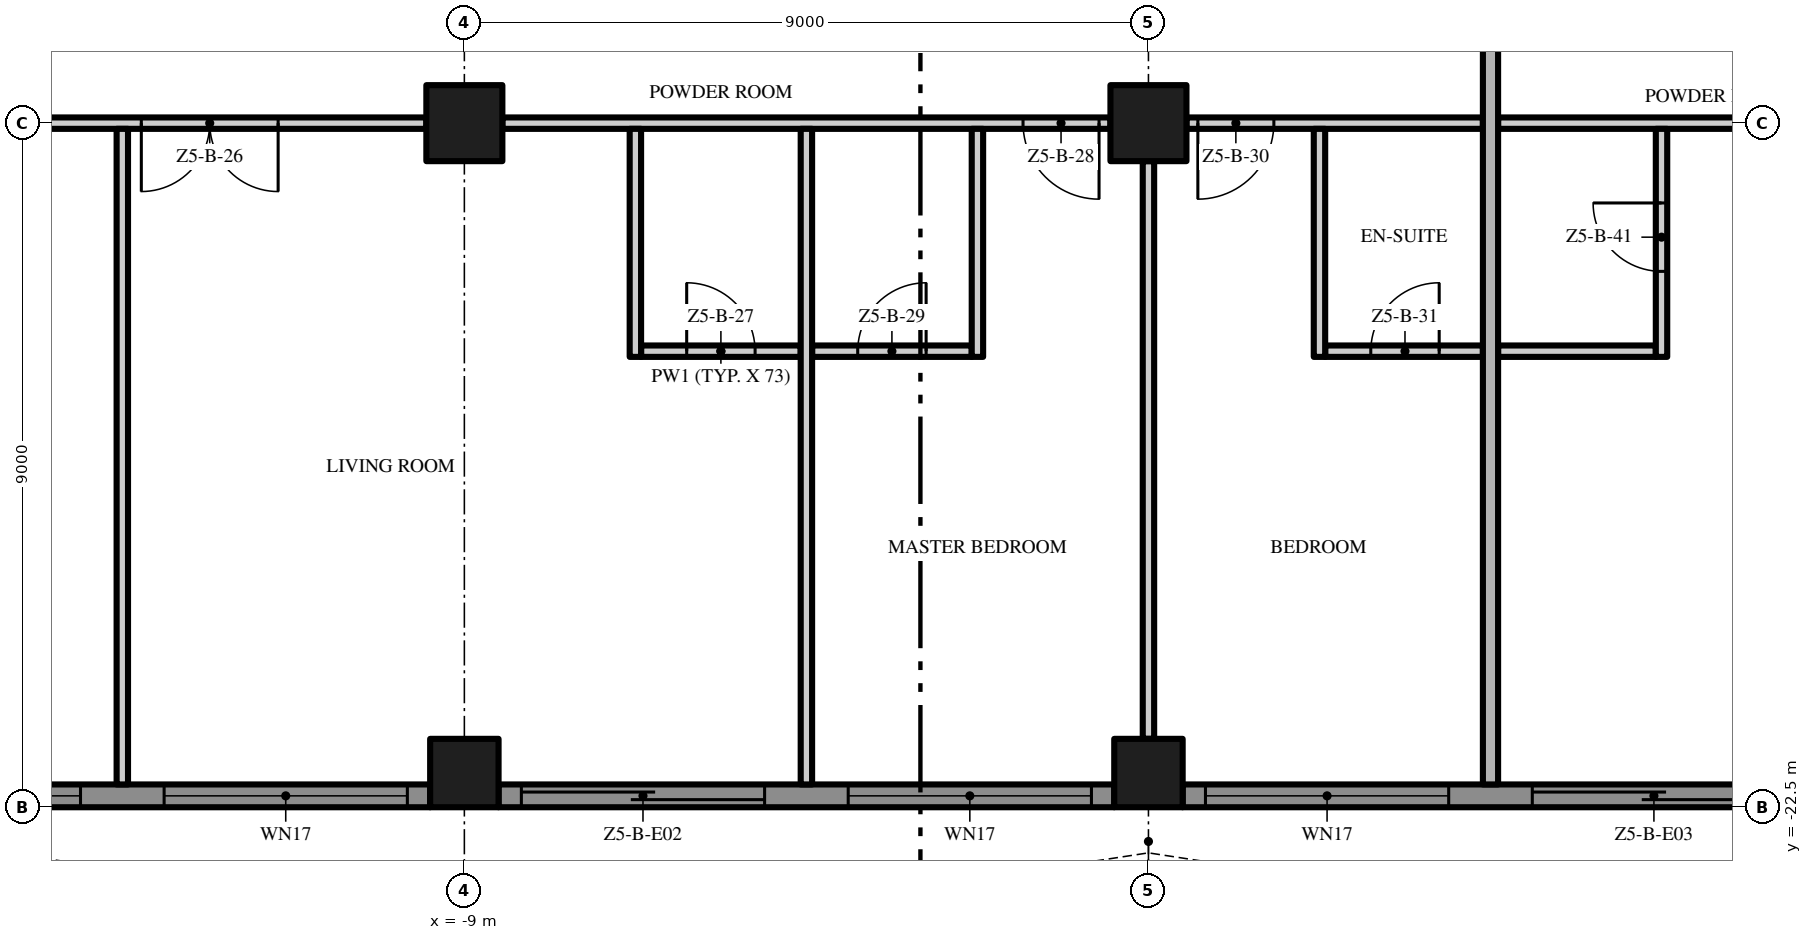
"""IFC4 building model, lengths in metres.
Left out: names, types, materials, properties, quantities, classifications, styles, units other than length and angle.
Written with IfcOpenShell. Run it as: python <this file> out.ifc"""

import sys

from ifc_helpers import new_model, si_unit, direction, frame, frame_2d, origin, origin_2d, place, context, subcontext, project, spatial, polyline, rectangle, outline, extrude, element, fill, save


model = new_model("IFC4")
c1 = context("Model", 3, precision=1e-05, world=origin(), true_north=direction((0.0, 1.0)))
c2 = subcontext(c1, "Body", "Model", "MODEL_VIEW")
j1 = project(units=[si_unit("LENGTHUNIT", "METRE"), si_unit("PLANEANGLEUNIT", "RADIAN")], contexts=[c1])
p1 = place(None, origin())
s1 = spatial("IfcSite", under=j1, at=p1, CompositionType="ELEMENT")
p2 = place(p1, origin())
s2 = spatial("IfcBuilding", under=s1, at=p2, CompositionType="ELEMENT")
p3 = place(p2, frame((0.0, 0.0, 250.2)))
s3 = spatial("IfcBuildingStorey", under=s2, at=p3, CompositionType="ELEMENT", Elevation=250.2)
p4 = place(p3, frame((-9.0, -13.5, 0.0), z_axis=(0.0, 0.0, 1.0), x_axis=(1.0, 0.0, 0.0)))
e1 = element("IfcColumn", 1, at=p4, inside=s3, PredefinedType="COLUMN", context=c2, shape_type="SweptSolid", body=[
    extrude(rectangle(XDim=1.0, YDim=1.0, at=origin_2d()), origin(), (0.0, 0.0, 1.0), 3.5),
])
p5 = place(p3, frame((-9.0, -22.05, 0.0), z_axis=(0.0, 0.0, 1.0), x_axis=(1.0, 0.0, 0.0)))
e2 = element("IfcColumn", 2, at=p5, inside=s3, PredefinedType="COLUMN", context=c2, shape_type="SweptSolid", body=[
    extrude(rectangle(XDim=0.9, YDim=0.9, at=origin_2d()), origin(), (0.0, 0.0, 1.0), 3.5),
])
p6 = place(p3, frame((0.0, -13.5, 0.0), z_axis=(0.0, 0.0, 1.0), x_axis=(1.0, 0.0, 0.0)))
e3 = element("IfcColumn", 3, at=p6, inside=s3, PredefinedType="COLUMN", context=c2, shape_type="SweptSolid", body=[
    extrude(rectangle(XDim=1.0, YDim=1.0, at=origin_2d()), origin(), (0.0, 0.0, 1.0), 3.5),
])
p7 = place(p3, frame((0.0, -22.05, 0.0), z_axis=(0.0, 0.0, 1.0), x_axis=(1.0, 0.0, 0.0)))
e4 = element("IfcColumn", 4, at=p7, inside=s3, PredefinedType="COLUMN", context=c2, shape_type="SweptSolid", body=[
    extrude(rectangle(XDim=0.9, YDim=0.9, at=origin_2d()), origin(), (0.0, 0.0, 1.0), 3.5),
])
p8 = place(p3, frame((-9.45, -22.35, 0.0), z_axis=(0.0, 0.0, 1.0), x_axis=(-1.0, 0.0, 0.0)))
e5 = element("IfcWall", 5, at=p8, inside=s3, PredefinedType="SOLIDWALL", context=c2, shape_type="SweptSolid", body=[
    extrude(rectangle(XDim=8.1, YDim=0.3, at=frame_2d((4.05, 0.0))), origin(), (0.0, 0.0, 1.0), 3.5),
])
p9 = place(p8, frame((4.6, 0.0, 0.45)))
e6 = element("IfcOpeningElement", 6, at=p9, cuts=e5, PredefinedType="OPENING", context=c2, shape_type="SweptSolid", body=[
    extrude(rectangle(XDim=3.2, YDim=2.65, at=frame_2d((1.6, 1.325))), frame((0.0, 0.16, 0.0), z_axis=(0.0, -1.0, 0.0), x_axis=(1.0, 0.0, 0.0)), (0.0, 0.0, 1.0), 0.32),
])
p10 = place(p8, frame((0.3, 0.0, 0.45)))
e7 = element("IfcOpeningElement", 7, at=p10, cuts=e5, PredefinedType="OPENING", context=c2, shape_type="SweptSolid", body=[
    extrude(rectangle(XDim=3.2, YDim=2.65, at=frame_2d((1.6, 1.325))), frame((0.0, 0.16, 0.0), z_axis=(0.0, -1.0, 0.0), x_axis=(1.0, 0.0, 0.0)), (0.0, 0.0, 1.0), 0.32),
])
p11 = place(p3, frame((-0.45, -22.35, 0.0), z_axis=(0.0, 0.0, 1.0), x_axis=(-1.0, 0.0, 0.0)))
e8 = element("IfcWall", 8, at=p11, inside=s3, PredefinedType="SOLIDWALL", context=c2, shape_type="SweptSolid", body=[
    extrude(rectangle(XDim=8.1, YDim=0.3, at=frame_2d((4.05, 0.0))), origin(), (0.0, 0.0, 1.0), 3.5),
])
p12 = place(p11, frame((4.6, 0.0, 0.0)))
e9 = element("IfcOpeningElement", 9, at=p12, cuts=e8, PredefinedType="OPENING", context=c2, shape_type="SweptSolid", body=[
    extrude(rectangle(XDim=3.2, YDim=2.4, at=frame_2d((1.6, 1.2))), frame((0.0, 0.16, 0.0), z_axis=(0.0, -1.0, 0.0), x_axis=(1.0, 0.0, 0.0)), (0.0, 0.0, 1.0), 0.32),
])
p13 = place(p11, frame((0.3, 0.0, 0.45)))
e10 = element("IfcOpeningElement", 10, at=p13, cuts=e8, PredefinedType="OPENING", context=c2, shape_type="SweptSolid", body=[
    extrude(rectangle(XDim=3.2, YDim=2.65, at=frame_2d((1.6, 1.325))), frame((0.0, 0.16, 0.0), z_axis=(0.0, -1.0, 0.0), x_axis=(1.0, 0.0, 0.0)), (0.0, 0.0, 1.0), 0.32),
])
p14 = place(p3, frame((8.55, -22.35, 0.0), z_axis=(0.0, 0.0, 1.0), x_axis=(-1.0, 0.0, 0.0)))
e11 = element("IfcWall", 11, at=p14, inside=s3, PredefinedType="SOLIDWALL", context=c2, shape_type="SweptSolid", body=[
    extrude(rectangle(XDim=8.1, YDim=0.3, at=frame_2d((4.05, 0.0))), origin(), (0.0, 0.0, 1.0), 3.5),
])
p15 = place(p14, frame((4.6, 0.0, 0.45)))
e12 = element("IfcOpeningElement", 12, at=p15, cuts=e11, PredefinedType="OPENING", context=c2, shape_type="SweptSolid", body=[
    extrude(rectangle(XDim=3.2, YDim=2.65, at=frame_2d((1.6, 1.325))), frame((0.0, 0.16, 0.0), z_axis=(0.0, -1.0, 0.0), x_axis=(1.0, 0.0, 0.0)), (0.0, 0.0, 1.0), 0.32),
])
p16 = place(p14, frame((0.3, 0.0, 0.0)))
e13 = element("IfcOpeningElement", 13, at=p16, cuts=e11, PredefinedType="OPENING", context=c2, shape_type="SweptSolid", body=[
    extrude(rectangle(XDim=3.2, YDim=2.4, at=frame_2d((1.6, 1.2))), frame((0.0, 0.16, 0.0), z_axis=(0.0, -1.0, 0.0), x_axis=(1.0, 0.0, 0.0)), (0.0, 0.0, 1.0), 0.32),
])
p17 = place(p3, origin())
e14 = element("IfcWall", 14, at=p17, inside=s3, PredefinedType="USERDEFINED", context=c2, shape_type="SweptSolid", body=[
    extrude(outline(polyline([(-22.5, -25.5), (-21.0, -25.271), (-19.5, -24.671), (-18.0, -23.929), (-16.5, -23.329), (-15.0, -23.1), (-13.5, -23.329), (-12.0, -23.929), (-10.5, -24.671), (-9.0, -25.271), (-7.5, -25.5), (-6.0, -25.271), (-4.5, -24.671), (-3.0, -23.929), (-1.5, -23.329), (0.0, -23.1), (1.5, -23.329), (3.0, -23.929), (4.5, -24.671), (6.0, -25.271), (7.5, -25.5), (9.0, -25.271), (10.5, -24.671), (12.0, -23.929), (13.5, -23.329), (15.0, -23.1), (16.5, -23.329), (18.0, -23.929), (19.5, -24.671), (21.0, -25.271), (22.5, -25.5), (22.538, -25.253), (21.066, -25.028), (19.602, -24.442), (18.102, -23.701), (16.566, -23.086), (15.0, -22.847), (13.434, -23.086), (11.898, -23.701), (10.398, -24.442), (8.934, -25.028), (7.5, -25.247), (6.066, -25.028), (4.602, -24.442), (3.102, -23.701), (1.566, -23.086), (0.0, -22.847), (-1.566, -23.086), (-3.102, -23.701), (-4.602, -24.442), (-6.066, -25.028), (-7.5, -25.247), (-8.934, -25.028), (-10.398, -24.442), (-11.898, -23.701), (-13.434, -23.086), (-15.0, -22.847), (-16.566, -23.086), (-18.102, -23.701), (-19.602, -24.442), (-21.066, -25.028), (-22.538, -25.253), (-22.5, -25.5)])), origin(), (0.0, 0.0, 1.0), 0.9),
])
p18 = place(p3, frame((-6.675, -16.5, 0.0), z_axis=(0.0, 0.0, 1.0), x_axis=(1.0, 0.0, 0.0)))
e15 = element("IfcWall", 15, at=p18, inside=s3, PredefinedType="PARTITIONING", context=c2, shape_type="SweptSolid", body=[
    extrude(rectangle(XDim=2.1, YDim=0.15, at=frame_2d((1.05, 0.0))), origin(), (0.0, 0.0, 1.0), 3.5),
])
p19 = place(p18, frame((0.6, 0.0, 0.0)))
e16 = element("IfcOpeningElement", 16, at=p19, cuts=e15, PredefinedType="OPENING", context=c2, shape_type="SweptSolid", body=[
    extrude(rectangle(XDim=0.9, YDim=2.1, at=frame_2d((0.45, 1.05))), frame((0.0, 0.085, 0.0), z_axis=(0.0, -1.0, 0.0), x_axis=(1.0, 0.0, 0.0)), (0.0, 0.0, 1.0), 0.17),
])
p20 = place(p3, frame((-4.425, -16.5, 0.0), z_axis=(0.0, 0.0, 1.0), x_axis=(1.0, 0.0, 0.0)))
e17 = element("IfcWall", 17, at=p20, inside=s3, PredefinedType="PARTITIONING", context=c2, shape_type="SweptSolid", body=[
    extrude(rectangle(XDim=2.1, YDim=0.15, at=frame_2d((1.05, 0.0))), origin(), (0.0, 0.0, 1.0), 3.5),
])
p21 = place(p20, frame((0.6, 0.0, 0.0)))
e18 = element("IfcOpeningElement", 18, at=p21, cuts=e17, PredefinedType="OPENING", context=c2, shape_type="SweptSolid", body=[
    extrude(rectangle(XDim=0.9, YDim=2.1, at=frame_2d((0.45, 1.05))), frame((0.0, 0.085, 0.0), z_axis=(0.0, -1.0, 0.0), x_axis=(1.0, 0.0, 0.0)), (0.0, 0.0, 1.0), 0.17),
])
p22 = place(p3, frame((2.325, -16.5, 0.0), z_axis=(0.0, 0.0, 1.0), x_axis=(1.0, 0.0, 0.0)))
e19 = element("IfcWall", 19, at=p22, inside=s3, PredefinedType="PARTITIONING", context=c2, shape_type="SweptSolid", body=[
    extrude(rectangle(XDim=2.075, YDim=0.15, at=frame_2d((1.038, 0.0))), origin(), (0.0, 0.0, 1.0), 3.5),
])
p23 = place(p22, frame((0.6, 0.0, 0.0)))
e20 = element("IfcOpeningElement", 20, at=p23, cuts=e19, PredefinedType="OPENING", context=c2, shape_type="SweptSolid", body=[
    extrude(rectangle(XDim=0.9, YDim=2.1, at=frame_2d((0.45, 1.05))), frame((0.0, 0.085, 0.0), z_axis=(0.0, -1.0, 0.0), x_axis=(1.0, 0.0, 0.0)), (0.0, 0.0, 1.0), 0.17),
])
p24 = place(p3, frame((4.6, -16.5, 0.0), z_axis=(0.0, 0.0, 1.0), x_axis=(1.0, 0.0, 0.0)))
e21 = element("IfcWall", 21, at=p24, inside=s3, PredefinedType="PARTITIONING", context=c2, shape_type="SweptSolid", body=[
    extrude(rectangle(XDim=2.075, YDim=0.15, at=frame_2d((1.038, 0.0))), origin(), (0.0, 0.0, 1.0), 3.5),
])
p25 = place(p3, frame((-9.5, -13.5, 0.0), z_axis=(0.0, 0.0, 1.0), x_axis=(-1.0, 0.0, 0.0)))
e22 = element("IfcWall", 22, at=p25, inside=s3, PredefinedType="PARTITIONING", context=c2, shape_type="SweptSolid", body=[
    extrude(rectangle(XDim=8.0, YDim=0.15, at=frame_2d((4.0, 0.0))), origin(), (0.0, 0.0, 1.0), 3.5),
])
p26 = place(p25, frame((1.95, 0.0, 0.0)))
e23 = element("IfcOpeningElement", 23, at=p26, cuts=e22, PredefinedType="OPENING", context=c2, shape_type="SweptSolid", body=[
    extrude(rectangle(XDim=1.8, YDim=2.4, at=frame_2d((0.9, 1.2))), frame((0.0, 0.085, 0.0), z_axis=(0.0, -1.0, 0.0), x_axis=(1.0, 0.0, 0.0)), (0.0, 0.0, 1.0), 0.17),
])
p27 = place(p3, frame((-0.5, -13.5, 0.0), z_axis=(0.0, 0.0, 1.0), x_axis=(-1.0, 0.0, 0.0)))
e24 = element("IfcWall", 24, at=p27, inside=s3, PredefinedType="PARTITIONING", context=c2, shape_type="SweptSolid", body=[
    extrude(rectangle(XDim=8.0, YDim=0.15, at=frame_2d((4.0, 0.0))), origin(), (0.0, 0.0, 1.0), 3.5),
])
p28 = place(p27, frame((0.15, 0.0, 0.0)))
e25 = element("IfcOpeningElement", 25, at=p28, cuts=e24, PredefinedType="OPENING", context=c2, shape_type="SweptSolid", body=[
    extrude(rectangle(XDim=1.0, YDim=2.4, at=frame_2d((0.5, 1.2))), frame((0.0, 0.085, 0.0), z_axis=(0.0, -1.0, 0.0), x_axis=(1.0, 0.0, 0.0)), (0.0, 0.0, 1.0), 0.17),
])
p29 = place(p3, frame((4.4, -13.5, 0.0), z_axis=(0.0, 0.0, 1.0), x_axis=(-1.0, 0.0, 0.0)))
e26 = element("IfcWall", 26, at=p29, inside=s3, PredefinedType="PARTITIONING", context=c2, shape_type="SweptSolid", body=[
    extrude(rectangle(XDim=3.9, YDim=0.15, at=frame_2d((1.95, 0.0))), origin(), (0.0, 0.0, 1.0), 3.5),
])
p30 = place(p29, frame((2.75, 0.0, 0.0)))
e27 = element("IfcOpeningElement", 27, at=p30, cuts=e26, PredefinedType="OPENING", context=c2, shape_type="SweptSolid", body=[
    extrude(rectangle(XDim=1.0, YDim=2.4, at=frame_2d((0.5, 1.2))), frame((0.0, 0.085, 0.0), z_axis=(0.0, -1.0, 0.0), x_axis=(1.0, 0.0, 0.0)), (0.0, 0.0, 1.0), 0.17),
])
p31 = place(p3, frame((4.6, -13.5, 0.0), z_axis=(0.0, 0.0, 1.0), x_axis=(1.0, 0.0, 0.0)))
e28 = element("IfcWall", 28, at=p31, inside=s3, PredefinedType="PARTITIONING", context=c2, shape_type="SweptSolid", body=[
    extrude(rectangle(XDim=3.9, YDim=0.15, at=frame_2d((1.95, 0.0))), origin(), (0.0, 0.0, 1.0), 3.5),
])
p32 = place(p3, frame((-13.5, -22.2, 0.0), z_axis=(0.0, 0.0, 1.0), x_axis=(0.0, 1.0, 0.0)))
e29 = element("IfcWall", 29, at=p32, inside=s3, PredefinedType="PARTITIONING", context=c2, shape_type="SweptSolid", body=[
    extrude(rectangle(XDim=8.625, YDim=0.15, at=frame_2d((4.312, 0.0))), origin(), (0.0, 0.0, 1.0), 3.5),
])
p33 = place(p3, frame((-6.75, -16.575, 0.0), z_axis=(0.0, 0.0, 1.0), x_axis=(0.0, 1.0, 0.0)))
e30 = element("IfcWall", 30, at=p33, inside=s3, PredefinedType="PARTITIONING", context=c2, shape_type="SweptSolid", body=[
    extrude(rectangle(XDim=3.0, YDim=0.15, at=frame_2d((1.5, 0.0))), origin(), (0.0, 0.0, 1.0), 3.5),
])
p34 = place(p3, frame((-4.5, -22.2, 0.0), z_axis=(0.0, 0.0, 1.0), x_axis=(0.0, 1.0, 0.0)))
e31 = element("IfcWall", 31, at=p34, inside=s3, PredefinedType="PARTITIONING", context=c2, shape_type="SweptSolid", body=[
    extrude(rectangle(XDim=8.625, YDim=0.15, at=frame_2d((4.312, 0.0))), origin(), (0.0, 0.0, 1.0), 3.5),
])
p35 = place(p3, frame((-2.25, -16.575, 0.0), z_axis=(0.0, 0.0, 1.0), x_axis=(0.0, 1.0, 0.0)))
e32 = element("IfcWall", 32, at=p35, inside=s3, PredefinedType="PARTITIONING", context=c2, shape_type="SweptSolid", body=[
    extrude(rectangle(XDim=3.0, YDim=0.15, at=frame_2d((1.5, 0.0))), origin(), (0.0, 0.0, 1.0), 3.5),
])
p36 = place(p3, frame((0.0, -21.6, 0.0), z_axis=(0.0, 0.0, 1.0), x_axis=(0.0, 1.0, 0.0)))
e33 = element("IfcWall", 33, at=p36, inside=s3, PredefinedType="PARTITIONING", context=c2, shape_type="SweptSolid", body=[
    extrude(rectangle(XDim=7.6, YDim=0.15, at=frame_2d((3.8, 0.0))), origin(), (0.0, 0.0, 1.0), 3.5),
])
p37 = place(p3, frame((2.25, -16.575, 0.0), z_axis=(0.0, 0.0, 1.0), x_axis=(0.0, 1.0, 0.0)))
e34 = element("IfcWall", 34, at=p37, inside=s3, PredefinedType="PARTITIONING", context=c2, shape_type="SweptSolid", body=[
    extrude(rectangle(XDim=3.0, YDim=0.15, at=frame_2d((1.5, 0.0))), origin(), (0.0, 0.0, 1.0), 3.5),
])
p38 = place(p3, frame((4.5, -22.2, 0.0), z_axis=(0.0, 0.0, 1.0), x_axis=(0.0, 1.0, 0.0)))
e35 = element("IfcWall", 35, at=p38, inside=s3, PredefinedType="PARTITIONING", context=c2, shape_type="SweptSolid", body=[
    extrude(rectangle(XDim=22.1, YDim=0.2, at=frame_2d((11.05, 0.0))), origin(), (0.0, 0.0, 1.0), 3.5),
])
p39 = place(p3, frame((6.75, -16.575, 0.0), z_axis=(0.0, 0.0, 1.0), x_axis=(0.0, 1.0, 0.0)))
e36 = element("IfcWall", 36, at=p39, inside=s3, PredefinedType="PARTITIONING", context=c2, shape_type="SweptSolid", body=[
    extrude(rectangle(XDim=3.0, YDim=0.15, at=frame_2d((1.5, 0.0))), origin(), (0.0, 0.0, 1.0), 3.5),
])
p40 = place(p39, frame((1.125, 0.0, 0.0)))
e37 = element("IfcOpeningElement", 37, at=p40, cuts=e36, PredefinedType="OPENING", context=c2, shape_type="SweptSolid", body=[
    extrude(rectangle(XDim=0.9, YDim=2.1, at=frame_2d((0.45, 1.05))), frame((0.0, 0.085, 0.0), z_axis=(0.0, -1.0, 0.0), x_axis=(1.0, 0.0, 0.0)), (0.0, 0.0, 1.0), 0.17),
])
p41 = place(p9, origin())
e38 = element("IfcWindow", 38, at=p41, inside=s3, PartitioningType="SINGLE_PANEL", PredefinedType="WINDOW", context=c2, shape_type="SweptSolid", body=[
    extrude(rectangle(XDim=3.2, YDim=2.65, at=frame_2d((1.6, 1.325))), frame((0.0, 0.03, 0.0), z_axis=(0.0, -1.0, 0.0), x_axis=(1.0, 0.0, 0.0)), (0.0, 0.0, 1.0), 0.06),
])
fill(e6, e38)
p42 = place(p10, origin())
e39 = element("IfcWindow", 39, at=p42, inside=s3, PartitioningType="SINGLE_PANEL", PredefinedType="WINDOW", context=c2, shape_type="SweptSolid", body=[
    extrude(rectangle(XDim=3.2, YDim=2.65, at=frame_2d((1.6, 1.325))), frame((0.0, 0.03, 0.0), z_axis=(0.0, -1.0, 0.0), x_axis=(1.0, 0.0, 0.0)), (0.0, 0.0, 1.0), 0.06),
])
fill(e7, e39)
p43 = place(p12, origin())
e40 = element("IfcDoor", 40, at=p43, inside=s3, OperationType="SINGLE_SWING_LEFT", PredefinedType="DOOR", context=c2, shape_type="SweptSolid", body=[
    extrude(rectangle(XDim=3.2, YDim=2.4, at=frame_2d((1.6, 1.2))), frame((0.0, 0.025, 0.0), z_axis=(0.0, -1.0, 0.0), x_axis=(1.0, 0.0, 0.0)), (0.0, 0.0, 1.0), 0.05),
])
fill(e9, e40)
p44 = place(p13, origin())
e41 = element("IfcWindow", 41, at=p44, inside=s3, PartitioningType="SINGLE_PANEL", PredefinedType="WINDOW", context=c2, shape_type="SweptSolid", body=[
    extrude(rectangle(XDim=3.2, YDim=2.65, at=frame_2d((1.6, 1.325))), frame((0.0, 0.03, 0.0), z_axis=(0.0, -1.0, 0.0), x_axis=(1.0, 0.0, 0.0)), (0.0, 0.0, 1.0), 0.06),
])
fill(e10, e41)
p45 = place(p15, origin())
e42 = element("IfcWindow", 42, at=p45, inside=s3, PartitioningType="SINGLE_PANEL", PredefinedType="WINDOW", context=c2, shape_type="SweptSolid", body=[
    extrude(rectangle(XDim=3.2, YDim=2.65, at=frame_2d((1.6, 1.325))), frame((0.0, 0.03, 0.0), z_axis=(0.0, -1.0, 0.0), x_axis=(1.0, 0.0, 0.0)), (0.0, 0.0, 1.0), 0.06),
])
fill(e12, e42)
p46 = place(p16, origin())
e43 = element("IfcDoor", 43, at=p46, inside=s3, OperationType="SINGLE_SWING_LEFT", PredefinedType="DOOR", context=c2, shape_type="SweptSolid", body=[
    extrude(rectangle(XDim=3.2, YDim=2.4, at=frame_2d((1.6, 1.2))), frame((0.0, 0.025, 0.0), z_axis=(0.0, -1.0, 0.0), x_axis=(1.0, 0.0, 0.0)), (0.0, 0.0, 1.0), 0.05),
])
fill(e13, e43)
p47 = place(p26, origin())
e44 = element("IfcDoor", 44, at=p47, inside=s3, OperationType="DOUBLE_DOOR_SINGLE_SWING", PredefinedType="DOOR", context=c2, shape_type="SweptSolid", body=[
    extrude(rectangle(XDim=1.8, YDim=2.4, at=frame_2d((0.9, 1.2))), frame((0.0, 0.025, 0.0), z_axis=(0.0, -1.0, 0.0), x_axis=(1.0, 0.0, 0.0)), (0.0, 0.0, 1.0), 0.05),
])
fill(e23, e44)
p48 = place(p19, origin())
e45 = element("IfcDoor", 45, at=p48, inside=s3, OperationType="SINGLE_SWING_LEFT", PredefinedType="DOOR", context=c2, shape_type="SweptSolid", body=[
    extrude(rectangle(XDim=0.9, YDim=2.1, at=frame_2d((0.45, 1.05))), frame((0.0, 0.025, 0.0), z_axis=(0.0, -1.0, 0.0), x_axis=(1.0, 0.0, 0.0)), (0.0, 0.0, 1.0), 0.05),
])
fill(e16, e45)
p49 = place(p28, origin())
e46 = element("IfcDoor", 46, at=p49, inside=s3, OperationType="SINGLE_SWING_LEFT", PredefinedType="DOOR", context=c2, shape_type="SweptSolid", body=[
    extrude(rectangle(XDim=1.0, YDim=2.4, at=frame_2d((0.5, 1.2))), frame((0.0, 0.025, 0.0), z_axis=(0.0, -1.0, 0.0), x_axis=(1.0, 0.0, 0.0)), (0.0, 0.0, 1.0), 0.05),
])
fill(e25, e46)
p50 = place(p21, origin())
e47 = element("IfcDoor", 47, at=p50, inside=s3, OperationType="SINGLE_SWING_RIGHT", PredefinedType="DOOR", context=c2, shape_type="SweptSolid", body=[
    extrude(rectangle(XDim=0.9, YDim=2.1, at=frame_2d((0.45, 1.05))), frame((0.0, 0.025, 0.0), z_axis=(0.0, -1.0, 0.0), x_axis=(1.0, 0.0, 0.0)), (0.0, 0.0, 1.0), 0.05),
])
fill(e18, e47)
p51 = place(p30, origin())
e48 = element("IfcDoor", 48, at=p51, inside=s3, OperationType="SINGLE_SWING_RIGHT", PredefinedType="DOOR", context=c2, shape_type="SweptSolid", body=[
    extrude(rectangle(XDim=1.0, YDim=2.4, at=frame_2d((0.5, 1.2))), frame((0.0, 0.025, 0.0), z_axis=(0.0, -1.0, 0.0), x_axis=(1.0, 0.0, 0.0)), (0.0, 0.0, 1.0), 0.05),
])
fill(e27, e48)
p52 = place(p23, origin())
e49 = element("IfcDoor", 49, at=p52, inside=s3, OperationType="SINGLE_SWING_RIGHT", PredefinedType="DOOR", context=c2, shape_type="SweptSolid", body=[
    extrude(rectangle(XDim=0.9, YDim=2.1, at=frame_2d((0.45, 1.05))), frame((0.0, 0.025, 0.0), z_axis=(0.0, -1.0, 0.0), x_axis=(1.0, 0.0, 0.0)), (0.0, 0.0, 1.0), 0.05),
])
fill(e20, e49)
p53 = place(p40, origin())
e50 = element("IfcDoor", 50, at=p53, inside=s3, OperationType="SINGLE_SWING_RIGHT", PredefinedType="DOOR", context=c2, shape_type="SweptSolid", body=[
    extrude(rectangle(XDim=0.9, YDim=2.1, at=frame_2d((0.45, 1.05))), frame((0.0, 0.025, 0.0), z_axis=(0.0, -1.0, 0.0), x_axis=(1.0, 0.0, 0.0)), (0.0, 0.0, 1.0), 0.05),
])
fill(e37, e50)
save(model, sys.argv[1])
